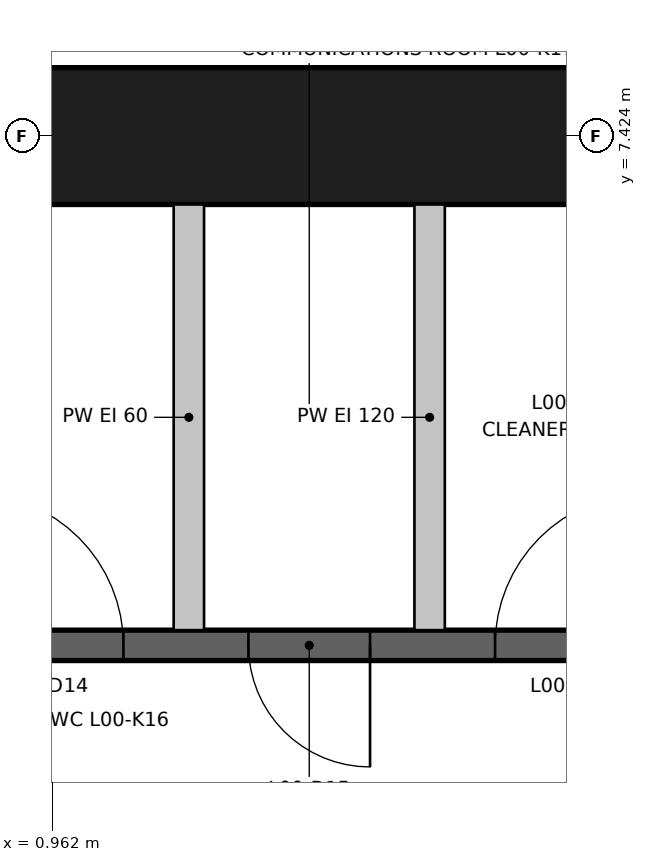
"""IFC4 building model, lengths in metres.
Left out: names, types, materials, properties, quantities, classifications, styles, units other than length and angle.
Written with IfcOpenShell. Run it as: python <this file> out.ifc"""

import sys

from ifc_helpers import new_model, si_unit, direction, frame, frame_2d, origin, place, context, subcontext, project, spatial, rectangle, extrude, element, fill, save


model = new_model("IFC4")
c1 = context("Model", 3, precision=1e-05, world=origin(), true_north=direction((0.0, 1.0)))
c2 = subcontext(c1, "Body", "Model", "MODEL_VIEW")
j1 = project(units=[si_unit("LENGTHUNIT", "METRE"), si_unit("PLANEANGLEUNIT", "RADIAN")], contexts=[c1])
p1 = place(None, origin())
s1 = spatial("IfcSite", under=j1, at=p1, CompositionType="ELEMENT")
p2 = place(p1, origin())
s2 = spatial("IfcBuilding", under=s1, at=p2, CompositionType="ELEMENT")
p3 = place(p2, origin())
s3 = spatial("IfcBuildingStorey", under=s2, at=p3, CompositionType="ELEMENT", Elevation=0.0)
p4 = place(p3, frame((-7.874, 7.424, -0.4), z_axis=(0.0, 0.0, 1.0), x_axis=(1.0, 0.0, 0.0)))
e1 = element("IfcWall", 1, at=p4, inside=s3, PredefinedType="SHEAR", context=c2, shape_type="SweptSolid", body=[
    extrude(rectangle(XDim=15.748, YDim=0.9, at=frame_2d((7.874, 0.0))), origin(), (0.0, 0.0, 1.0), 5.6),
])
p5 = place(p3, frame((0.0, 4.074, 0.0), z_axis=(0.0, 0.0, 1.0), x_axis=(1.0, 0.0, 0.0)))
e2 = element("IfcWall", 2, at=p5, inside=s3, PredefinedType="SHEAR", context=c2, shape_type="SweptSolid", body=[
    extrude(rectangle(XDim=6.974, YDim=0.2, at=frame_2d((3.487, 0.0))), origin(), (0.0, 0.0, 1.0), 4.8),
])
p6 = place(p5, frame((0.43, 0.0, 0.0)))
e3 = element("IfcOpeningElement", 3, at=p6, cuts=e2, PredefinedType="OPENING", context=c2, shape_type="SweptSolid", body=[
    extrude(rectangle(XDim=1.0, YDim=2.1, at=frame_2d((0.5, 1.05))), frame((0.0, 0.11, 0.0), z_axis=(0.0, -1.0, 0.0), x_axis=(1.0, 0.0, 0.0)), (0.0, 0.0, 1.0), 0.22),
])
p7 = place(p5, frame((2.253, 0.0, 0.0)))
e4 = element("IfcOpeningElement", 4, at=p7, cuts=e2, PredefinedType="OPENING", context=c2, shape_type="SweptSolid", body=[
    extrude(rectangle(XDim=0.8, YDim=2.1, at=frame_2d((0.4, 1.05))), frame((0.0, 0.11, 0.0), z_axis=(0.0, -1.0, 0.0), x_axis=(1.0, 0.0, 0.0)), (0.0, 0.0, 1.0), 0.22),
])
p8 = place(p5, frame((3.875, 0.0, 0.0)))
e5 = element("IfcOpeningElement", 5, at=p8, cuts=e2, PredefinedType="OPENING", context=c2, shape_type="SweptSolid", body=[
    extrude(rectangle(XDim=1.0, YDim=2.1, at=frame_2d((0.5, 1.05))), frame((0.0, 0.11, 0.0), z_axis=(0.0, -1.0, 0.0), x_axis=(1.0, 0.0, 0.0)), (0.0, 0.0, 1.0), 0.22),
])
p9 = place(p5, frame((5.79, 0.0, 0.0)))
e6 = element("IfcOpeningElement", 6, at=p9, cuts=e2, PredefinedType="OPENING", context=c2, shape_type="SweptSolid", body=[
    extrude(rectangle(XDim=0.8, YDim=2.1, at=frame_2d((0.4, 1.05))), frame((0.0, 0.11, 0.0), z_axis=(0.0, -1.0, 0.0), x_axis=(1.0, 0.0, 0.0)), (0.0, 0.0, 1.0), 0.22),
])
for number, where, z_axis, x_axis in (
    (7, (1.861, 4.174, 0.0), (0.0, 0.0, 1.0), (0.0, 1.0, 0.0)),
    (8, (3.445, 4.174, 0.0), (0.0, 0.0, 1.0), (0.0, 1.0, 0.0)),
):
    element("IfcWall", number, at=place(p3, frame(where, z_axis=z_axis, x_axis=x_axis)), inside=s3, PredefinedType="PARTITIONING", context=c2, shape_type="SweptSolid", body=[
        extrude(rectangle(XDim=2.8, YDim=0.2, at=frame_2d((1.4, 0.0))), origin(), (0.0, 0.0, 1.0), 4.8),
    ])
p10 = place(p6, origin())
e9 = element("IfcDoor", 9, at=p10, inside=s3, OperationType="SINGLE_SWING_LEFT", PredefinedType="DOOR", context=c2, shape_type="SweptSolid", body=[
    extrude(rectangle(XDim=1.0, YDim=2.1, at=frame_2d((0.5, 1.05))), frame((0.0, 0.025, 0.0), z_axis=(0.0, -1.0, 0.0), x_axis=(1.0, 0.0, 0.0)), (0.0, 0.0, 1.0), 0.05),
])
fill(e3, e9)
p11 = place(p7, frame((0.8, 0.0, 0.0), z_axis=(0.0, 0.0, 1.0), x_axis=(-1.0, 0.0, 0.0)))
e10 = element("IfcDoor", 10, at=p11, inside=s3, OperationType="SINGLE_SWING_RIGHT", PredefinedType="DOOR", context=c2, shape_type="SweptSolid", body=[
    extrude(rectangle(XDim=0.8, YDim=2.1, at=frame_2d((0.4, 1.05))), frame((0.0, 0.025, 0.0), z_axis=(0.0, -1.0, 0.0), x_axis=(1.0, 0.0, 0.0)), (0.0, 0.0, 1.0), 0.05),
])
fill(e4, e10)
p12 = place(p8, origin())
e11 = element("IfcDoor", 11, at=p12, inside=s3, OperationType="SINGLE_SWING_RIGHT", PredefinedType="DOOR", context=c2, shape_type="SweptSolid", body=[
    extrude(rectangle(XDim=1.0, YDim=2.1, at=frame_2d((0.5, 1.05))), frame((0.0, 0.025, 0.0), z_axis=(0.0, -1.0, 0.0), x_axis=(1.0, 0.0, 0.0)), (0.0, 0.0, 1.0), 0.05),
])
fill(e5, e11)
save(model, sys.argv[1])
